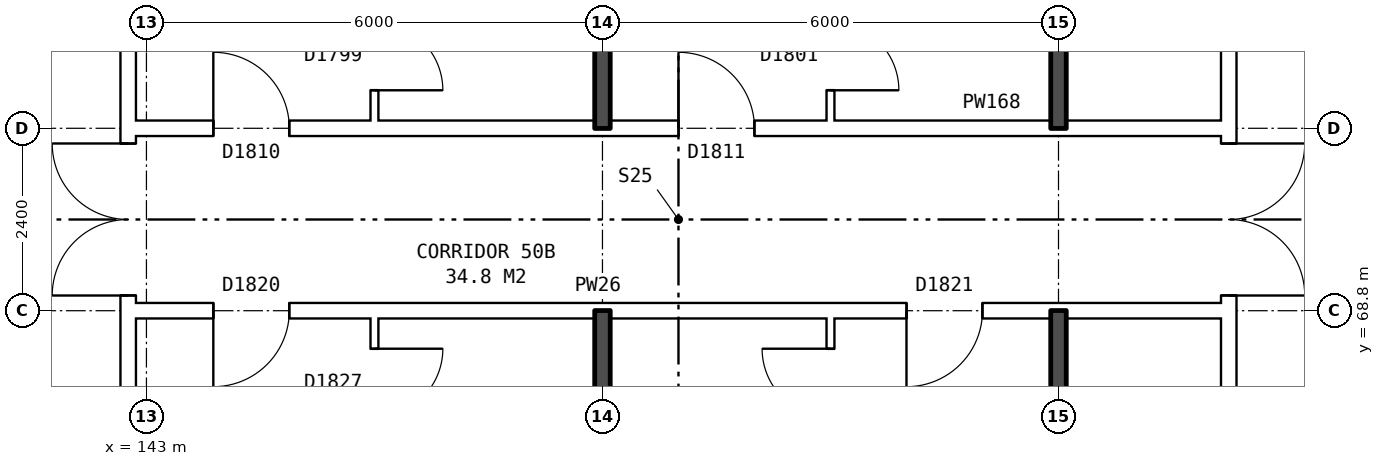
"""IFC4 building model, lengths in metres.
Left out: names, types, materials, properties, quantities, classifications, styles, units other than length and angle.
Written with IfcOpenShell. Run it as: python <this file> out.ifc"""

import sys

from ifc_helpers import new_model, si_unit, direction, frame, frame_2d, origin, place, context, subcontext, project, spatial, rectangle, extrude, element, fill, save


model = new_model("IFC4")
c1 = context("Model", 3, precision=1e-05, world=origin(), true_north=direction((0.0, 1.0)))
c2 = subcontext(c1, "Body", "Model", "MODEL_VIEW")
j1 = project(units=[si_unit("LENGTHUNIT", "METRE"), si_unit("PLANEANGLEUNIT", "RADIAN")], contexts=[c1])
p1 = place(None, origin())
s1 = spatial("IfcSite", under=j1, at=p1, CompositionType="ELEMENT")
p2 = place(p1, origin())
s2 = spatial("IfcBuilding", under=s1, at=p2, CompositionType="ELEMENT")
p3 = place(p2, frame((0.0, 0.0, 178.9)))
s3 = spatial("IfcBuildingStorey", under=s2, at=p3, CompositionType="ELEMENT", Elevation=178.9)
p4 = place(p3, frame((142.76, 63.9, 0.0), z_axis=(0.0, 0.0, 1.0), x_axis=(0.0, 1.0, 0.0)))
e1 = element("IfcWall", 1, at=p4, inside=s3, PredefinedType="PARTITIONING", context=c2, shape_type="SweptSolid", body=[
    extrude(rectangle(XDim=12.2, YDim=0.2, at=frame_2d((6.1, 0.0))), origin(), (0.0, 0.0, 1.0), 2.85),
])
p5 = place(p4, frame((5.1, 0.0, 0.0)))
e2 = element("IfcOpeningElement", 2, at=p5, cuts=e1, PredefinedType="OPENING", context=c2, shape_type="SweptSolid", body=[
    extrude(rectangle(XDim=2.0, YDim=2.1, at=frame_2d((1.0, 1.05))), frame((0.0, 0.11, 0.0), z_axis=(0.0, -1.0, 0.0), x_axis=(1.0, 0.0, 0.0)), (0.0, 0.0, 1.0), 0.22),
])
p6 = place(p3, frame((157.24, 63.9, 0.0), z_axis=(0.0, 0.0, 1.0), x_axis=(0.0, 1.0, 0.0)))
e3 = element("IfcWall", 3, at=p6, inside=s3, PredefinedType="PARTITIONING", context=c2, shape_type="SweptSolid", body=[
    extrude(rectangle(XDim=12.2, YDim=0.2, at=frame_2d((6.1, 0.0))), origin(), (0.0, 0.0, 1.0), 2.85),
])
p7 = place(p6, frame((5.1, 0.0, 0.0)))
e4 = element("IfcOpeningElement", 4, at=p7, cuts=e3, PredefinedType="OPENING", context=c2, shape_type="SweptSolid", body=[
    extrude(rectangle(XDim=2.0, YDim=2.1, at=frame_2d((1.0, 1.05))), frame((0.0, 0.11, 0.0), z_axis=(0.0, -1.0, 0.0), x_axis=(1.0, 0.0, 0.0)), (0.0, 0.0, 1.0), 0.22),
])
p8 = place(p3, frame((142.76, 68.8, 0.0), z_axis=(0.0, 0.0, 1.0), x_axis=(1.0, 0.0, 0.0)))
e5 = element("IfcWall", 5, at=p8, inside=s3, PredefinedType="PARTITIONING", context=c2, shape_type="SweptSolid", body=[
    extrude(rectangle(XDim=14.48, YDim=0.2, at=frame_2d((7.24, 0.0))), origin(), (0.0, 0.0, 1.0), 2.85),
])
p9 = place(p8, frame((1.12, 0.0, 0.0)))
e6 = element("IfcOpeningElement", 6, at=p9, cuts=e5, PredefinedType="OPENING", context=c2, shape_type="SweptSolid", body=[
    extrude(rectangle(XDim=1.0, YDim=2.1, at=frame_2d((0.5, 1.05))), frame((0.0, 0.11, 0.0), z_axis=(0.0, -1.0, 0.0), x_axis=(1.0, 0.0, 0.0)), (0.0, 0.0, 1.0), 0.22),
])
p10 = place(p8, frame((10.24, 0.0, 0.0)))
e7 = element("IfcOpeningElement", 7, at=p10, cuts=e5, PredefinedType="OPENING", context=c2, shape_type="SweptSolid", body=[
    extrude(rectangle(XDim=1.0, YDim=2.1, at=frame_2d((0.5, 1.05))), frame((0.0, 0.11, 0.0), z_axis=(0.0, -1.0, 0.0), x_axis=(1.0, 0.0, 0.0)), (0.0, 0.0, 1.0), 0.22),
])
p11 = place(p3, frame((142.76, 71.2, 0.0), z_axis=(0.0, 0.0, 1.0), x_axis=(1.0, 0.0, 0.0)))
e8 = element("IfcWall", 8, at=p11, inside=s3, PredefinedType="PARTITIONING", context=c2, shape_type="SweptSolid", body=[
    extrude(rectangle(XDim=14.48, YDim=0.2, at=frame_2d((7.24, 0.0))), origin(), (0.0, 0.0, 1.0), 2.85),
])
p12 = place(p11, frame((1.12, 0.0, 0.0)))
e9 = element("IfcOpeningElement", 9, at=p12, cuts=e8, PredefinedType="OPENING", context=c2, shape_type="SweptSolid", body=[
    extrude(rectangle(XDim=1.0, YDim=2.1, at=frame_2d((0.5, 1.05))), frame((0.0, 0.11, 0.0), z_axis=(0.0, -1.0, 0.0), x_axis=(1.0, 0.0, 0.0)), (0.0, 0.0, 1.0), 0.22),
])
p13 = place(p11, frame((7.24, 0.0, 0.0)))
e10 = element("IfcOpeningElement", 10, at=p13, cuts=e8, PredefinedType="OPENING", context=c2, shape_type="SweptSolid", body=[
    extrude(rectangle(XDim=1.0, YDim=2.1, at=frame_2d((0.5, 1.05))), frame((0.0, 0.11, 0.0), z_axis=(0.0, -1.0, 0.0), x_axis=(1.0, 0.0, 0.0)), (0.0, 0.0, 1.0), 0.22),
])
p14 = place(p3, frame((146.0, 54.36, 0.0), z_axis=(0.0, 0.0, 1.0), x_axis=(0.0, 1.0, 0.0)))
e11 = element("IfcWall", 11, at=p14, inside=s3, PredefinedType="PARTITIONING", context=c2, shape_type="SweptSolid", body=[
    extrude(rectangle(XDim=14.34, YDim=0.1, at=frame_2d((7.17, 0.0))), origin(), (0.0, 0.0, 1.0), 2.85),
])
p15 = place(p14, frame((7.7, 0.0, 0.0)))
e12 = element("IfcOpeningElement", 12, at=p15, cuts=e11, PredefinedType="OPENING", context=c2, shape_type="SweptSolid", body=[
    extrude(rectangle(XDim=0.9, YDim=2.1, at=frame_2d((0.45, 1.05))), frame((0.0, 0.06, 0.0), z_axis=(0.0, -1.0, 0.0), x_axis=(1.0, 0.0, 0.0)), (0.0, 0.0, 1.0), 0.12),
])
p16 = place(p14, frame((13.04, 0.0, 0.0)))
e13 = element("IfcOpeningElement", 13, at=p16, cuts=e11, PredefinedType="OPENING", context=c2, shape_type="SweptSolid", body=[
    extrude(rectangle(XDim=0.9, YDim=2.1, at=frame_2d((0.45, 1.05))), frame((0.0, 0.06, 0.0), z_axis=(0.0, -1.0, 0.0), x_axis=(1.0, 0.0, 0.0)), (0.0, 0.0, 1.0), 0.12),
])
p17 = place(p3, frame((146.0, 71.3, 0.0), z_axis=(0.0, 0.0, 1.0), x_axis=(0.0, 1.0, 0.0)))
e14 = element("IfcWall", 14, at=p17, inside=s3, PredefinedType="PARTITIONING", context=c2, shape_type="SweptSolid", body=[
    extrude(rectangle(XDim=14.34, YDim=0.1, at=frame_2d((7.17, 0.0))), origin(), (0.0, 0.0, 1.0), 2.85),
])
p18 = place(p17, frame((5.74, 0.0, 0.0)))
e15 = element("IfcOpeningElement", 15, at=p18, cuts=e14, PredefinedType="OPENING", context=c2, shape_type="SweptSolid", body=[
    extrude(rectangle(XDim=0.9, YDim=2.1, at=frame_2d((0.45, 1.05))), frame((0.0, 0.06, 0.0), z_axis=(0.0, -1.0, 0.0), x_axis=(1.0, 0.0, 0.0)), (0.0, 0.0, 1.0), 0.12),
])
p19 = place(p17, frame((0.4, 0.0, 0.0)))
e16 = element("IfcOpeningElement", 16, at=p19, cuts=e14, PredefinedType="OPENING", context=c2, shape_type="SweptSolid", body=[
    extrude(rectangle(XDim=0.9, YDim=2.1, at=frame_2d((0.45, 1.05))), frame((0.0, 0.06, 0.0), z_axis=(0.0, -1.0, 0.0), x_axis=(1.0, 0.0, 0.0)), (0.0, 0.0, 1.0), 0.12),
])
for number, where, z_axis, x_axis in (
    (17, (149.0, 54.36, 0.0), (0.0, 0.0, 1.0), (0.0, 1.0, 0.0)),
    (18, (149.0, 71.2, 0.0), (0.0, 0.0, 1.0), (0.0, 1.0, 0.0)),
):
    element("IfcWall", number, at=place(p3, frame(where, z_axis=z_axis, x_axis=x_axis)), inside=s3, PredefinedType="SOLIDWALL", context=c2, shape_type="SweptSolid", body=[
        extrude(rectangle(XDim=14.44, YDim=0.2, at=frame_2d((7.22, 0.0))), origin(), (0.0, 0.0, 1.0), 2.85),
    ])
p20 = place(p3, frame((152.0, 54.36, 0.0), z_axis=(0.0, 0.0, 1.0), x_axis=(0.0, 1.0, 0.0)))
e19 = element("IfcWall", 19, at=p20, inside=s3, PredefinedType="PARTITIONING", context=c2, shape_type="SweptSolid", body=[
    extrude(rectangle(XDim=14.34, YDim=0.1, at=frame_2d((7.17, 0.0))), origin(), (0.0, 0.0, 1.0), 2.85),
])
p21 = place(p20, frame((5.5, 0.0, 0.0)))
e20 = element("IfcOpeningElement", 20, at=p21, cuts=e19, PredefinedType="OPENING", context=c2, shape_type="SweptSolid", body=[
    extrude(rectangle(XDim=0.9, YDim=2.1, at=frame_2d((0.45, 1.05))), frame((0.0, 0.06, 0.0), z_axis=(0.0, -1.0, 0.0), x_axis=(1.0, 0.0, 0.0)), (0.0, 0.0, 1.0), 0.12),
])
p22 = place(p20, frame((13.04, 0.0, 0.0)))
e21 = element("IfcOpeningElement", 21, at=p22, cuts=e19, PredefinedType="OPENING", context=c2, shape_type="SweptSolid", body=[
    extrude(rectangle(XDim=0.9, YDim=2.1, at=frame_2d((0.45, 1.05))), frame((0.0, 0.06, 0.0), z_axis=(0.0, -1.0, 0.0), x_axis=(1.0, 0.0, 0.0)), (0.0, 0.0, 1.0), 0.12),
])
p23 = place(p3, frame((152.0, 71.3, 0.0), z_axis=(0.0, 0.0, 1.0), x_axis=(0.0, 1.0, 0.0)))
e22 = element("IfcWall", 22, at=p23, inside=s3, PredefinedType="PARTITIONING", context=c2, shape_type="SweptSolid", body=[
    extrude(rectangle(XDim=14.34, YDim=0.1, at=frame_2d((7.17, 0.0))), origin(), (0.0, 0.0, 1.0), 2.85),
])
p24 = place(p23, frame((6.74, 0.0, 0.0)))
e23 = element("IfcOpeningElement", 23, at=p24, cuts=e22, PredefinedType="OPENING", context=c2, shape_type="SweptSolid", body=[
    extrude(rectangle(XDim=0.9, YDim=2.1, at=frame_2d((0.45, 1.05))), frame((0.0, 0.06, 0.0), z_axis=(0.0, -1.0, 0.0), x_axis=(1.0, 0.0, 0.0)), (0.0, 0.0, 1.0), 0.12),
])
p25 = place(p23, frame((0.4, 0.0, 0.0)))
e24 = element("IfcOpeningElement", 24, at=p25, cuts=e22, PredefinedType="OPENING", context=c2, shape_type="SweptSolid", body=[
    extrude(rectangle(XDim=0.9, YDim=2.1, at=frame_2d((0.45, 1.05))), frame((0.0, 0.06, 0.0), z_axis=(0.0, -1.0, 0.0), x_axis=(1.0, 0.0, 0.0)), (0.0, 0.0, 1.0), 0.12),
])
for number, where, z_axis, x_axis in (
    (25, (155.0, 63.8, 0.0), (0.0, 0.0, 1.0), (0.0, 1.0, 0.0)),
    (26, (155.0, 71.2, 0.0), (0.0, 0.0, 1.0), (0.0, 1.0, 0.0)),
):
    element("IfcWall", number, at=place(p3, frame(where, z_axis=z_axis, x_axis=x_axis)), inside=s3, PredefinedType="SOLIDWALL", context=c2, shape_type="SweptSolid", body=[
        extrude(rectangle(XDim=5.0, YDim=0.2, at=frame_2d((2.5, 0.0))), origin(), (0.0, 0.0, 1.0), 2.85),
    ])
p26 = place(p5, origin())
e27 = element("IfcDoor", 27, at=p26, inside=s3, OperationType="DOUBLE_DOOR_SINGLE_SWING", PredefinedType="DOOR", context=c2, shape_type="SweptSolid", body=[
    extrude(rectangle(XDim=2.0, YDim=2.1, at=frame_2d((1.0, 1.05))), frame((0.0, 0.025, 0.0), z_axis=(0.0, -1.0, 0.0), x_axis=(1.0, 0.0, 0.0)), (0.0, 0.0, 1.0), 0.05),
])
fill(e2, e27)
p27 = place(p7, frame((2.0, 0.0, 0.0), z_axis=(0.0, 0.0, 1.0), x_axis=(-1.0, 0.0, 0.0)))
e28 = element("IfcDoor", 28, at=p27, inside=s3, OperationType="DOUBLE_DOOR_SINGLE_SWING", PredefinedType="DOOR", context=c2, shape_type="SweptSolid", body=[
    extrude(rectangle(XDim=2.0, YDim=2.1, at=frame_2d((1.0, 1.05))), frame((0.0, 0.025, 0.0), z_axis=(0.0, -1.0, 0.0), x_axis=(1.0, 0.0, 0.0)), (0.0, 0.0, 1.0), 0.05),
])
fill(e4, e28)
p28 = place(p9, frame((1.0, 0.0, 0.0), z_axis=(0.0, 0.0, 1.0), x_axis=(-1.0, 0.0, 0.0)))
e29 = element("IfcDoor", 29, at=p28, inside=s3, OperationType="SINGLE_SWING_RIGHT", PredefinedType="DOOR", context=c2, shape_type="SweptSolid", body=[
    extrude(rectangle(XDim=1.0, YDim=2.1, at=frame_2d((0.5, 1.05))), frame((0.0, 0.025, 0.0), z_axis=(0.0, -1.0, 0.0), x_axis=(1.0, 0.0, 0.0)), (0.0, 0.0, 1.0), 0.05),
])
fill(e6, e29)
p29 = place(p16, frame((0.9, 0.0, 0.0), z_axis=(0.0, 0.0, 1.0), x_axis=(-1.0, 0.0, 0.0)))
e30 = element("IfcDoor", 30, at=p29, inside=s3, OperationType="SINGLE_SWING_LEFT", PredefinedType="DOOR", context=c2, shape_type="SweptSolid", body=[
    extrude(rectangle(XDim=0.9, YDim=2.1, at=frame_2d((0.45, 1.05))), frame((0.0, 0.025, 0.0), z_axis=(0.0, -1.0, 0.0), x_axis=(1.0, 0.0, 0.0)), (0.0, 0.0, 1.0), 0.05),
])
fill(e13, e30)
p30 = place(p10, frame((1.0, 0.0, 0.0), z_axis=(0.0, 0.0, 1.0), x_axis=(-1.0, 0.0, 0.0)))
e31 = element("IfcDoor", 31, at=p30, inside=s3, OperationType="SINGLE_SWING_RIGHT", PredefinedType="DOOR", context=c2, shape_type="SweptSolid", body=[
    extrude(rectangle(XDim=1.0, YDim=2.1, at=frame_2d((0.5, 1.05))), frame((0.0, 0.025, 0.0), z_axis=(0.0, -1.0, 0.0), x_axis=(1.0, 0.0, 0.0)), (0.0, 0.0, 1.0), 0.05),
])
fill(e7, e31)
p31 = place(p22, origin())
e32 = element("IfcDoor", 32, at=p31, inside=s3, OperationType="SINGLE_SWING_RIGHT", PredefinedType="DOOR", context=c2, shape_type="SweptSolid", body=[
    extrude(rectangle(XDim=0.9, YDim=2.1, at=frame_2d((0.45, 1.05))), frame((0.0, 0.025, 0.0), z_axis=(0.0, -1.0, 0.0), x_axis=(1.0, 0.0, 0.0)), (0.0, 0.0, 1.0), 0.05),
])
fill(e21, e32)
p32 = place(p12, origin())
e33 = element("IfcDoor", 33, at=p32, inside=s3, OperationType="SINGLE_SWING_LEFT", PredefinedType="DOOR", context=c2, shape_type="SweptSolid", body=[
    extrude(rectangle(XDim=1.0, YDim=2.1, at=frame_2d((0.5, 1.05))), frame((0.0, 0.025, 0.0), z_axis=(0.0, -1.0, 0.0), x_axis=(1.0, 0.0, 0.0)), (0.0, 0.0, 1.0), 0.05),
])
fill(e9, e33)
p33 = place(p19, frame((0.9, 0.0, 0.0), z_axis=(0.0, 0.0, 1.0), x_axis=(-1.0, 0.0, 0.0)))
e34 = element("IfcDoor", 34, at=p33, inside=s3, OperationType="SINGLE_SWING_RIGHT", PredefinedType="DOOR", context=c2, shape_type="SweptSolid", body=[
    extrude(rectangle(XDim=0.9, YDim=2.1, at=frame_2d((0.45, 1.05))), frame((0.0, 0.025, 0.0), z_axis=(0.0, -1.0, 0.0), x_axis=(1.0, 0.0, 0.0)), (0.0, 0.0, 1.0), 0.05),
])
fill(e16, e34)
p34 = place(p13, origin())
e35 = element("IfcDoor", 35, at=p34, inside=s3, OperationType="SINGLE_SWING_LEFT", PredefinedType="DOOR", context=c2, shape_type="SweptSolid", body=[
    extrude(rectangle(XDim=1.0, YDim=2.1, at=frame_2d((0.5, 1.05))), frame((0.0, 0.025, 0.0), z_axis=(0.0, -1.0, 0.0), x_axis=(1.0, 0.0, 0.0)), (0.0, 0.0, 1.0), 0.05),
])
fill(e10, e35)
p35 = place(p25, frame((0.9, 0.0, 0.0), z_axis=(0.0, 0.0, 1.0), x_axis=(-1.0, 0.0, 0.0)))
e36 = element("IfcDoor", 36, at=p35, inside=s3, OperationType="SINGLE_SWING_RIGHT", PredefinedType="DOOR", context=c2, shape_type="SweptSolid", body=[
    extrude(rectangle(XDim=0.9, YDim=2.1, at=frame_2d((0.45, 1.05))), frame((0.0, 0.025, 0.0), z_axis=(0.0, -1.0, 0.0), x_axis=(1.0, 0.0, 0.0)), (0.0, 0.0, 1.0), 0.05),
])
fill(e24, e36)
save(model, sys.argv[1])
